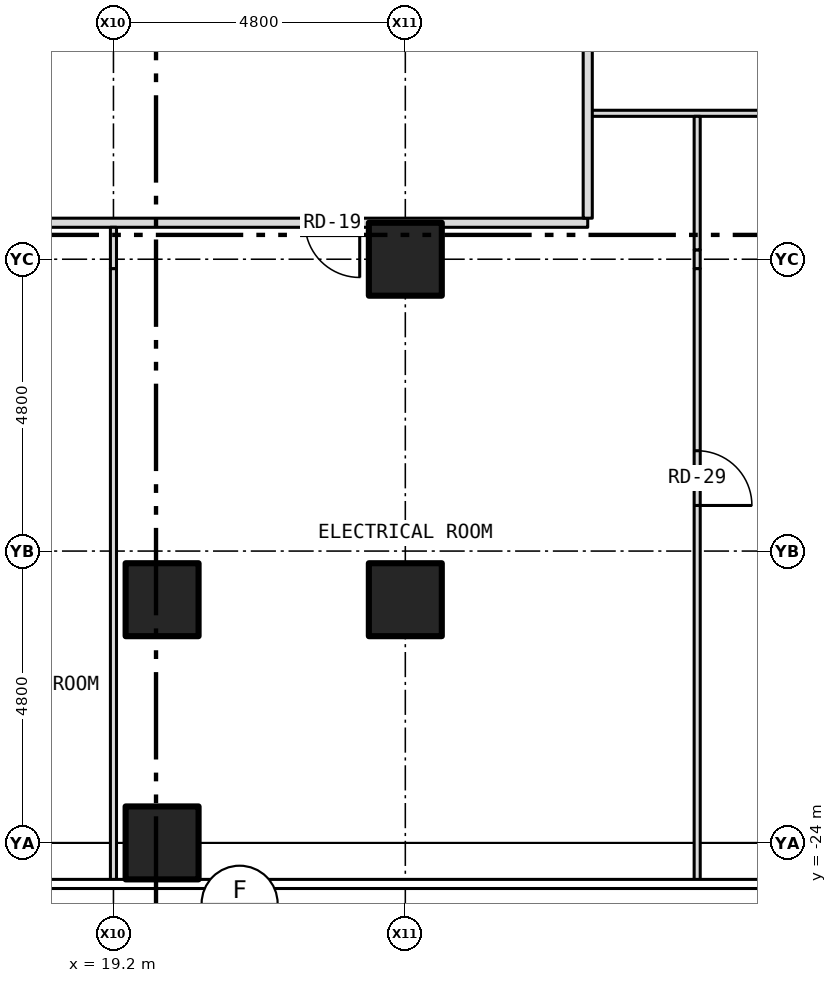
"""IFC4 building model, lengths in metres.
Left out: names, types, materials, properties, quantities, classifications, styles, units other than length and angle.
Written with IfcOpenShell. Run it as: python <this file> out.ifc"""

import sys

from ifc_helpers import new_model, si_unit, direction, frame, frame_2d, origin, origin_2d, place, context, subcontext, project, spatial, rectangle, hollow_rectangle, extrude, element, fill, save


model = new_model("IFC4")
c1 = context("Model", 3, precision=1e-05, world=origin(), true_north=direction((0.0, 1.0)))
c2 = subcontext(c1, "Body", "Model", "MODEL_VIEW")
j1 = project(units=[si_unit("LENGTHUNIT", "METRE"), si_unit("PLANEANGLEUNIT", "RADIAN")], contexts=[c1])
p1 = place(None, origin())
s1 = spatial("IfcSite", under=j1, at=p1, CompositionType="ELEMENT")
p2 = place(p1, origin())
s2 = spatial("IfcBuilding", under=s1, at=p2, CompositionType="ELEMENT")
p3 = place(p2, frame((0.0, 0.0, 29.0)))
s3 = spatial("IfcBuildingStorey", under=s2, at=p3, CompositionType="ELEMENT", Elevation=29.0)
for number, where, z_axis, x_axis in (
    (1, (20.0, -24.0, -0.2), (0.0, 0.0, 1.0), (1.0, 0.0, 0.0)),
    (2, (20.0, -20.0, -0.2), (0.0, 0.0, 1.0), (1.0, 0.0, 0.0)),
    (3, (24.0, -20.0, -0.2), (0.0, 0.0, 1.0), (1.0, 0.0, 0.0)),
    (4, (24.0, -14.4, -0.2), (0.0, 0.0, 1.0), (1.0, 0.0, 0.0)),
):
    element("IfcColumn", number, at=place(p3, frame(where, z_axis=z_axis, x_axis=x_axis)), inside=s3, PredefinedType="COLUMN", context=c2, shape_type="SweptSolid", body=[
        extrude(hollow_rectangle(XDim=1.2, YDim=1.2, WallThickness=0.07, at=origin_2d()), origin(), (0.0, 0.0, 1.0), 4.4),
    ])
p4 = place(p3, frame((-27.0, -13.8, 0.0), z_axis=(0.0, 0.0, 1.0), x_axis=(1.0, 0.0, 0.0)))
e5 = element("IfcWall", 5, at=p4, inside=s3, PredefinedType="PARTITIONING", context=c2, shape_type="SweptSolid", body=[
    extrude(rectangle(XDim=54.0, YDim=0.15, at=frame_2d((27.0, 0.0))), origin(), (0.0, 0.0, 1.0), 4.2),
])
p5 = place(p4, frame((37.83, 0.0, 0.0)))
e6 = element("IfcOpeningElement", 6, at=p5, cuts=e5, PredefinedType="OPENING", context=c2, shape_type="SweptSolid", body=[
    extrude(rectangle(XDim=0.9, YDim=2.1, at=frame_2d((0.45, 1.05))), frame((0.0, 0.087, 0.0), z_axis=(0.0, -1.0, 0.0), x_axis=(1.0, 0.0, 0.0)), (0.0, 0.0, 1.0), 0.174),
])
p6 = place(p4, frame((39.88, 0.0, 0.0)))
e7 = element("IfcOpeningElement", 7, at=p6, cuts=e5, PredefinedType="OPENING", context=c2, shape_type="SweptSolid", body=[
    extrude(rectangle(XDim=0.9, YDim=2.1, at=frame_2d((0.45, 1.05))), frame((0.0, 0.087, 0.0), z_axis=(0.0, -1.0, 0.0), x_axis=(1.0, 0.0, 0.0)), (0.0, 0.0, 1.0), 0.174),
])
p7 = place(p4, frame((43.75, 0.0, 0.0)))
e8 = element("IfcOpeningElement", 8, at=p7, cuts=e5, PredefinedType="OPENING", context=c2, shape_type="SweptSolid", body=[
    extrude(rectangle(XDim=0.9, YDim=2.1, at=frame_2d((0.45, 1.05))), frame((0.0, 0.087, 0.0), z_axis=(0.0, -1.0, 0.0), x_axis=(1.0, 0.0, 0.0)), (0.0, 0.0, 1.0), 0.174),
])
p8 = place(p4, frame((9.801, 0.0, 0.0)))
e9 = element("IfcOpeningElement", 9, at=p8, cuts=e5, PredefinedType="OPENING", context=c2, shape_type="SweptSolid", body=[
    extrude(rectangle(XDim=0.9, YDim=2.1, at=frame_2d((0.45, 1.05))), frame((0.0, 0.087, 0.0), z_axis=(0.0, -1.0, 0.0), x_axis=(1.0, 0.0, 0.0)), (0.0, 0.0, 1.0), 0.174),
])
p9 = place(p4, frame((14.601, 0.0, 0.0)))
e10 = element("IfcOpeningElement", 10, at=p9, cuts=e5, PredefinedType="OPENING", context=c2, shape_type="SweptSolid", body=[
    extrude(rectangle(XDim=0.9, YDim=2.1, at=frame_2d((0.45, 1.05))), frame((0.0, 0.087, 0.0), z_axis=(0.0, -1.0, 0.0), x_axis=(1.0, 0.0, 0.0)), (0.0, 0.0, 1.0), 0.174),
])
p10 = place(p4, frame((20.095, 0.0, 0.0)))
e11 = element("IfcOpeningElement", 11, at=p10, cuts=e5, PredefinedType="OPENING", context=c2, shape_type="SweptSolid", body=[
    extrude(rectangle(XDim=0.9, YDim=2.1, at=frame_2d((0.45, 1.05))), frame((0.0, 0.087, 0.0), z_axis=(0.0, -1.0, 0.0), x_axis=(1.0, 0.0, 0.0)), (0.0, 0.0, 1.0), 0.174),
])
p11 = place(p4, frame((24.303, 0.0, 0.0)))
e12 = element("IfcOpeningElement", 12, at=p11, cuts=e5, PredefinedType="OPENING", context=c2, shape_type="SweptSolid", body=[
    extrude(rectangle(XDim=0.9, YDim=2.1, at=frame_2d((0.45, 1.05))), frame((0.0, 0.087, 0.0), z_axis=(0.0, -1.0, 0.0), x_axis=(1.0, 0.0, 0.0)), (0.0, 0.0, 1.0), 0.174),
])
p12 = place(p4, frame((3.75, 0.0, 0.0)))
e13 = element("IfcOpeningElement", 13, at=p12, cuts=e5, PredefinedType="OPENING", context=c2, shape_type="SweptSolid", body=[
    extrude(rectangle(XDim=0.9, YDim=2.1, at=frame_2d((0.45, 1.05))), frame((0.0, 0.087, 0.0), z_axis=(0.0, -1.0, 0.0), x_axis=(1.0, 0.0, 0.0)), (0.0, 0.0, 1.0), 0.174),
])
p13 = place(p4, frame((49.35, 0.0, 0.0)))
e14 = element("IfcOpeningElement", 14, at=p13, cuts=e5, PredefinedType="OPENING", context=c2, shape_type="SweptSolid", body=[
    extrude(rectangle(XDim=0.9, YDim=2.1, at=frame_2d((0.45, 1.05))), frame((0.0, 0.087, 0.0), z_axis=(0.0, -1.0, 0.0), x_axis=(1.0, 0.0, 0.0)), (0.0, 0.0, 1.0), 0.174),
])
p14 = place(p4, frame((32.454, 0.0, 0.0)))
e15 = element("IfcOpeningElement", 15, at=p14, cuts=e5, PredefinedType="OPENING", context=c2, shape_type="SweptSolid", body=[
    extrude(rectangle(XDim=0.9, YDim=2.1, at=frame_2d((0.45, 1.05))), frame((0.0, 0.087, 0.0), z_axis=(0.0, -1.0, 0.0), x_axis=(1.0, 0.0, 0.0)), (0.0, 0.0, 1.0), 0.174),
])
p15 = place(p3, frame((27.0, -12.0, 0.0), z_axis=(0.0, 0.0, 1.0), x_axis=(1.0, 0.0, 0.0)))
e16 = element("IfcWall", 16, at=p15, inside=s3, PredefinedType="PARTITIONING", context=c2, shape_type="SweptSolid", body=[
    extrude(rectangle(XDim=11.28, YDim=0.1, at=frame_2d((5.64, 0.0))), origin(), (0.0, 0.0, 1.0), 4.2),
])
p16 = place(p3, frame((19.2, -24.63, 0.0), z_axis=(0.0, 0.0, 1.0), x_axis=(0.0, 1.0, 0.0)))
e17 = element("IfcWall", 17, at=p16, inside=s3, PredefinedType="PARTITIONING", context=c2, shape_type="SweptSolid", body=[
    extrude(rectangle(XDim=10.076, YDim=0.1, at=frame_2d((5.038, 0.0))), origin(), (0.0, 0.0, 1.0), 3.583),
])
p17 = place(p3, frame((19.2, -14.554, 0.0), z_axis=(0.0, 0.0, 1.0), x_axis=(0.0, 1.0, 0.0)))
e18 = element("IfcWall", 18, at=p17, inside=s3, PredefinedType="PARTITIONING", context=c2, shape_type="SweptSolid", body=[
    extrude(rectangle(XDim=0.679, YDim=0.1, at=frame_2d((0.339, 0.0))), origin(), (0.0, 0.0, 1.0), 4.2),
])
p18 = place(p3, frame((27.0, -13.725, 0.0), z_axis=(0.0, 0.0, 1.0), x_axis=(0.0, 1.0, 0.0)))
e19 = element("IfcWall", 19, at=p18, inside=s3, PredefinedType="PARTITIONING", context=c2, shape_type="SweptSolid", body=[
    extrude(rectangle(XDim=27.45, YDim=0.15, at=frame_2d((13.725, 0.0))), origin(), (0.0, 0.0, 1.0), 4.2),
])
p19 = place(p18, frame((7.275, 0.0, 0.0)))
e20 = element("IfcOpeningElement", 20, at=p19, cuts=e19, PredefinedType="OPENING", context=c2, shape_type="SweptSolid", body=[
    extrude(rectangle(XDim=0.9, YDim=2.1, at=frame_2d((0.45, 1.05))), frame((0.0, 0.087, 0.0), z_axis=(0.0, -1.0, 0.0), x_axis=(1.0, 0.0, 0.0)), (0.0, 0.0, 1.0), 0.174),
])
p20 = place(p18, frame((19.275, 0.0, 0.0)))
e21 = element("IfcOpeningElement", 21, at=p20, cuts=e19, PredefinedType="OPENING", context=c2, shape_type="SweptSolid", body=[
    extrude(rectangle(XDim=0.9, YDim=2.1, at=frame_2d((0.45, 1.05))), frame((0.0, 0.087, 0.0), z_axis=(0.0, -1.0, 0.0), x_axis=(1.0, 0.0, 0.0)), (0.0, 0.0, 1.0), 0.174),
])
p21 = place(p3, frame((28.8, -24.63, 0.0), z_axis=(0.0, 0.0, 1.0), x_axis=(0.0, 1.0, 0.0)))
e22 = element("IfcWall", 22, at=p21, inside=s3, PredefinedType="PARTITIONING", context=c2, shape_type="SweptSolid", body=[
    extrude(rectangle(XDim=10.076, YDim=0.1, at=frame_2d((5.038, 0.0))), origin(), (0.0, 0.0, 1.0), 3.583),
])
p22 = place(p21, frame((6.18, 0.0, 0.0)))
e23 = element("IfcOpeningElement", 23, at=p22, cuts=e22, PredefinedType="OPENING", context=c2, shape_type="SweptSolid", body=[
    extrude(rectangle(XDim=0.9, YDim=2.1, at=frame_2d((0.45, 1.05))), frame((0.0, 0.062, 0.0), z_axis=(0.0, -1.0, 0.0), x_axis=(1.0, 0.0, 0.0)), (0.0, 0.0, 1.0), 0.124),
])
p23 = place(p3, frame((28.8, -14.554, 0.0), z_axis=(0.0, 0.0, 1.0), x_axis=(0.0, 1.0, 0.0)))
e24 = element("IfcWall", 24, at=p23, inside=s3, PredefinedType="PARTITIONING", context=c2, shape_type="SweptSolid", body=[
    extrude(rectangle(XDim=0.308, YDim=0.1, at=frame_2d((0.154, 0.0))), origin(), (0.0, 0.0, 1.0), 4.2),
])
p24 = place(p3, frame((28.8, -14.246, 0.0), z_axis=(0.0, 0.0, 1.0), x_axis=(0.0, 1.0, 0.0)))
e25 = element("IfcWall", 25, at=p24, inside=s3, PredefinedType="PARTITIONING", context=c2, shape_type="SweptSolid", body=[
    extrude(rectangle(XDim=2.196, YDim=0.1, at=frame_2d((1.098, 0.0))), origin(), (0.0, 0.0, 1.0), 3.583),
])
p25 = place(p13, origin())
e26 = element("IfcDoor", 26, at=p25, inside=s3, OperationType="SINGLE_SWING_RIGHT", PredefinedType="DOOR", context=c2, shape_type="SweptSolid", body=[
    extrude(rectangle(XDim=0.9, YDim=2.1, at=frame_2d((0.45, 1.05))), frame((0.0, 0.025, 0.0), z_axis=(0.0, -1.0, 0.0), x_axis=(1.0, 0.0, 0.0)), (0.0, 0.0, 1.0), 0.05),
])
fill(e14, e26)
p26 = place(p22, origin())
e27 = element("IfcDoor", 27, at=p26, inside=s3, OperationType="SINGLE_SWING_LEFT", PredefinedType="DOOR", context=c2, shape_type="SweptSolid", body=[
    extrude(rectangle(XDim=0.9, YDim=2.1, at=frame_2d((0.45, 1.05))), frame((0.0, 0.025, 0.0), z_axis=(0.0, -1.0, 0.0), x_axis=(1.0, 0.0, 0.0)), (0.0, 0.0, 1.0), 0.05),
])
fill(e23, e27)
save(model, sys.argv[1])
